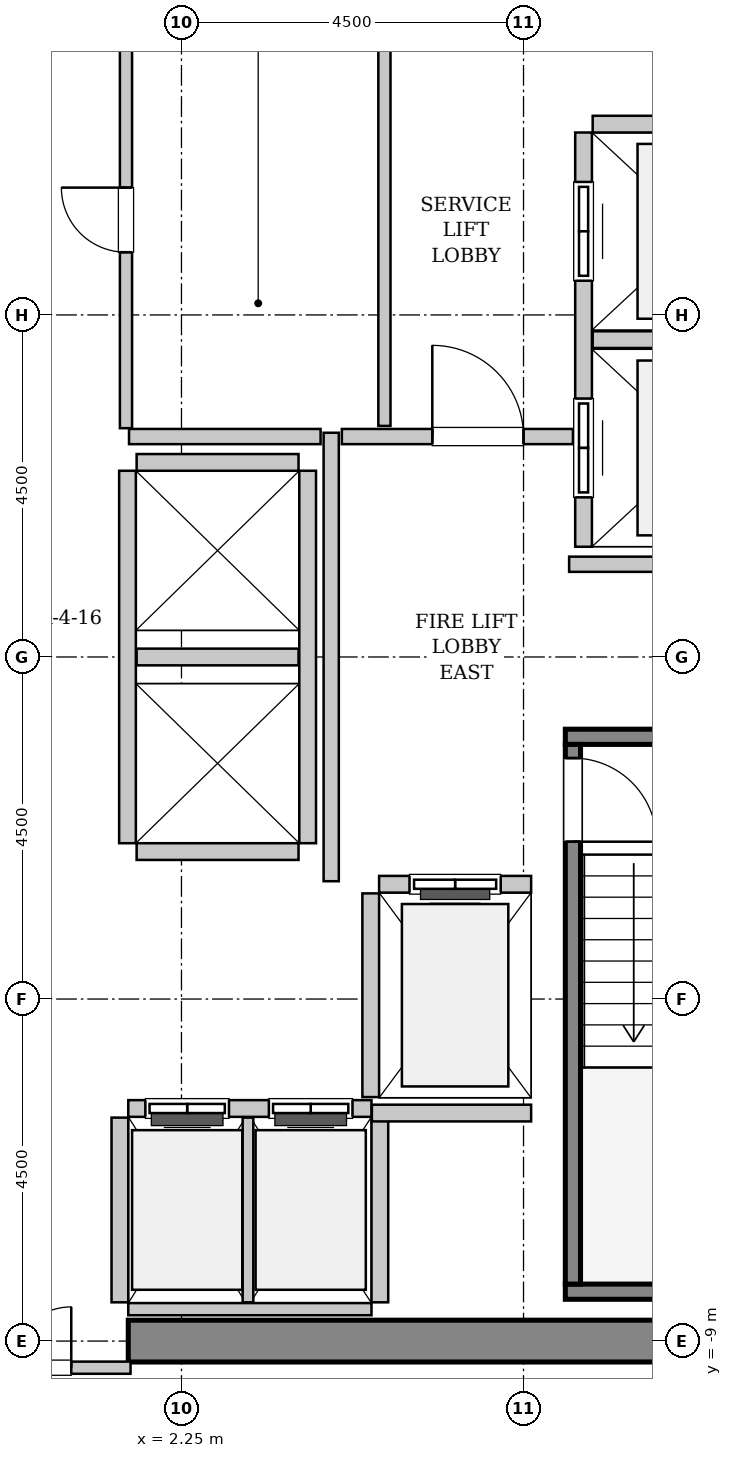
"""IFC4 building model, lengths in metres.
Left out: names, types, materials, properties, quantities, classifications, styles, units other than length and angle.
Written with IfcOpenShell. Run it as: python <this file> out.ifc"""

import sys

from ifc_helpers import new_model, si_unit, direction, frame, frame_2d, origin, place, context, subcontext, project, spatial, rectangle, extrude, source, transform, mapped, element, fill, save


model = new_model("IFC4")
c1 = context("Model", 3, precision=1e-05, world=origin(), true_north=direction((0.0, 1.0)))
c2 = subcontext(c1, "Body", "Model", "MODEL_VIEW")
j1 = project(units=[si_unit("LENGTHUNIT", "METRE"), si_unit("PLANEANGLEUNIT", "RADIAN")], contexts=[c1])
p1 = place(None, origin())
s1 = spatial("IfcSite", under=j1, at=p1, CompositionType="ELEMENT")
p2 = place(p1, origin())
s2 = spatial("IfcBuilding", under=s1, at=p2, CompositionType="ELEMENT")
p3 = place(p2, frame((0.0, 0.0, 160.2)))
s3 = spatial("IfcBuildingStorey", under=s2, at=p3, CompositionType="ELEMENT", Elevation=160.2)
m1 = source(origin(), c2, "Body", "SweptSolid", [
    extrude(rectangle(XDim=9.975, YDim=0.55, at=frame_2d((4.987, 0.0))), origin(), (0.0, 0.0, 1.0), 3.8),
])
p4 = place(p3, frame((1.55, -9.0, 0.0), z_axis=(0.0, 0.0, 1.0), x_axis=(1.0, 0.0, 0.0)))
e1 = element("IfcWall", 1, at=p4, inside=s3, PredefinedType="SHEAR", context=c2, shape_type="MappedRepresentation", body=[
    mapped(m1, transform((0.0, 0.0, 0.0), x_axis=(1.0, 0.0, 0.0), y_axis=(0.0, 1.0, 0.0), z_axis=(0.0, 0.0, 1.0), scale=1.0)),
])
m2 = source(origin(), c2, "Body", "SweptSolid", [
    extrude(rectangle(XDim=3.4, YDim=0.2, at=frame_2d((1.7, 0.0))), origin(), (0.0, 0.0, 1.0), 3.8),
])
p5 = place(p3, frame((7.3, -1.05, 0.0), z_axis=(0.0, 0.0, 1.0), x_axis=(1.0, 0.0, 0.0)))
e2 = element("IfcWall", 2, at=p5, inside=s3, PredefinedType="SOLIDWALL", context=c2, shape_type="MappedRepresentation", body=[
    mapped(m2, transform((0.0, 0.0, 0.0), x_axis=(1.0, 0.0, 0.0), y_axis=(0.0, 1.0, 0.0), z_axis=(0.0, 0.0, 1.0), scale=1.0)),
])
m3 = source(origin(), c2, "Body", "SweptSolid", [
    extrude(rectangle(XDim=3.68, YDim=0.2, at=frame_2d((1.84, 0.0))), origin(), (0.0, 0.0, 1.0), 3.8),
])
p6 = place(p3, frame((7.3, -8.35, 0.0), z_axis=(0.0, 0.0, 1.0), x_axis=(1.0, 0.0, 0.0)))
e3 = element("IfcWall", 3, at=p6, inside=s3, PredefinedType="SOLIDWALL", context=c2, shape_type="MappedRepresentation", body=[
    mapped(m3, transform((0.0, 0.0, 0.0), x_axis=(1.0, 0.0, 0.0), y_axis=(0.0, 1.0, 0.0), z_axis=(0.0, 0.0, 1.0), scale=1.0)),
])
m4 = source(origin(), c2, "Body", "SweptSolid", [
    extrude(rectangle(XDim=7.1, YDim=0.2, at=frame_2d((3.55, 0.0))), origin(), (0.0, 0.0, 1.0), 3.8),
])
p7 = place(p3, frame((7.4, -1.15, 0.0), z_axis=(0.0, 0.0, 1.0), x_axis=(0.0, -1.0, 0.0)))
e4 = element("IfcWall", 4, at=p7, inside=s3, PredefinedType="SOLIDWALL", context=c2, shape_type="MappedRepresentation", body=[
    mapped(m4, transform((0.0, 0.0, 0.0), x_axis=(1.0, 0.0, 0.0), y_axis=(0.0, 1.0, 0.0), z_axis=(0.0, 0.0, 1.0), scale=1.0)),
])
p8 = place(p7, frame((0.18, 0.0, 0.0)))
e5 = element("IfcOpeningElement", 5, at=p8, cuts=e4, PredefinedType="OPENING", context=c2, shape_type="SweptSolid", body=[
    extrude(rectangle(XDim=1.1, YDim=2.15, at=frame_2d((0.55, 1.075))), frame((0.0, 0.11, 0.0), z_axis=(0.0, -1.0, 0.0), x_axis=(1.0, 0.0, 0.0)), (0.0, 0.0, 1.0), 0.22),
])
m5 = source(origin(), c2, "Body", "SweptSolid", [
    extrude(rectangle(XDim=2.0, YDim=0.22, at=frame_2d((1.0, 0.0))), origin(), (0.0, 0.0, 1.0), 3.535),
])
p9 = place(p3, frame((6.85, -2.99, 0.0), z_axis=(0.0, 0.0, 1.0), x_axis=(-1.0, 0.0, 0.0)))
e6 = element("IfcWall", 6, at=p9, inside=s3, PredefinedType="SOLIDWALL", context=c2, shape_type="MappedRepresentation", body=[
    mapped(m5, transform((0.0, 0.0, 0.0), x_axis=(1.0, 0.0, 0.0), y_axis=(0.0, 1.0, 0.0), z_axis=(0.0, 0.0, 1.0), scale=1.0)),
])
p10 = place(p9, frame((0.4, 0.0, 0.0)))
e7 = element("IfcOpeningElement", 7, at=p10, cuts=e6, PredefinedType="OPENING", context=c2, shape_type="SweptSolid", body=[
    extrude(rectangle(XDim=1.2, YDim=2.2, at=frame_2d((0.6, 1.1))), frame((0.0, 0.12, 0.0), z_axis=(0.0, -1.0, 0.0), x_axis=(1.0, 0.0, 0.0)), (0.0, 0.0, 1.0), 0.24),
])
m6 = source(origin(), c2, "Body", "SweptSolid", [
    extrude(rectangle(XDim=2.68, YDim=0.22, at=frame_2d((1.34, 0.0))), origin(), (0.0, 0.0, 1.0), 3.535),
])
p11 = place(p3, frame((4.74, -3.11, 0.0), z_axis=(0.0, 0.0, 1.0), x_axis=(0.0, -1.0, 0.0)))
e8 = element("IfcWall", 8, at=p11, inside=s3, PredefinedType="SOLIDWALL", context=c2, shape_type="MappedRepresentation", body=[
    mapped(m6, transform((0.0, 0.0, 0.0), x_axis=(1.0, 0.0, 0.0), y_axis=(0.0, 1.0, 0.0), z_axis=(0.0, 0.0, 1.0), scale=1.0)),
])
m7 = source(origin(), c2, "Body", "SweptSolid", [
    extrude(rectangle(XDim=5.45, YDim=0.22, at=frame_2d((2.725, 0.0))), origin(), (0.0, 0.0, 1.0), 3.535),
])
p12 = place(p3, frame((7.54, 6.9, 0.0), z_axis=(0.0, 0.0, 1.0), x_axis=(0.0, -1.0, 0.0)))
e9 = element("IfcWall", 9, at=p12, inside=s3, PredefinedType="SOLIDWALL", context=c2, shape_type="MappedRepresentation", body=[
    mapped(m7, transform((0.0, 0.0, 0.0), x_axis=(1.0, 0.0, 0.0), y_axis=(0.0, 1.0, 0.0), z_axis=(0.0, 0.0, 1.0), scale=1.0)),
])
p13 = place(p12, frame((3.5, 0.0, 0.0)))
e10 = element("IfcOpeningElement", 10, at=p13, cuts=e9, PredefinedType="OPENING", context=c2, shape_type="SweptSolid", body=[
    extrude(rectangle(XDim=1.3, YDim=2.3, at=frame_2d((0.65, 1.15))), frame((0.0, 0.12, 0.0), z_axis=(0.0, -1.0, 0.0), x_axis=(1.0, 0.0, 0.0)), (0.0, 0.0, 1.0), 0.24),
])
p14 = place(p12, frame((0.65, 0.0, 0.0)))
e11 = element("IfcOpeningElement", 11, at=p14, cuts=e9, PredefinedType="OPENING", context=c2, shape_type="SweptSolid", body=[
    extrude(rectangle(XDim=1.3, YDim=2.3, at=frame_2d((0.65, 1.15))), frame((0.0, 0.12, 0.0), z_axis=(0.0, -1.0, 0.0), x_axis=(1.0, 0.0, 0.0)), (0.0, 0.0, 1.0), 0.24),
])
m8 = source(origin(), c2, "Body", "SweptSolid", [
    extrude(rectangle(XDim=2.78, YDim=0.22, at=frame_2d((1.39, 0.0))), origin(), (0.0, 0.0, 1.0), 3.535),
])
for number, where, z_axis, x_axis in (
    (12, (7.66, 4.175, 0.0), (0.0, 0.0, 1.0), (1.0, 0.0, 0.0)),
    (13, (10.44, 7.01, 0.0), (0.0, 0.0, 1.0), (-1.0, 0.0, 0.0)),
):
    element("IfcWall", number, at=place(p3, frame(where, z_axis=z_axis, x_axis=x_axis)), inside=s3, PredefinedType="SOLIDWALL", context=c2, shape_type="MappedRepresentation", body=[
        mapped(m8, transform((0.0, 0.0, 0.0), x_axis=(1.0, 0.0, 0.0), y_axis=(0.0, 1.0, 0.0), z_axis=(0.0, 0.0, 1.0), scale=1.0)),
    ])
m9 = source(origin(), c2, "Body", "SweptSolid", [
    extrude(rectangle(XDim=3.2, YDim=0.22, at=frame_2d((1.6, 0.0))), origin(), (0.0, 0.0, 1.0), 3.535),
])
p15 = place(p3, frame((4.75, -5.94, 0.0), z_axis=(0.0, 0.0, 1.0), x_axis=(-1.0, 0.0, 0.0)))
e14 = element("IfcWall", 14, at=p15, inside=s3, PredefinedType="SOLIDWALL", context=c2, shape_type="MappedRepresentation", body=[
    mapped(m9, transform((0.0, 0.0, 0.0), x_axis=(1.0, 0.0, 0.0), y_axis=(0.0, 1.0, 0.0), z_axis=(0.0, 0.0, 1.0), scale=1.0)),
])
p16 = place(p15, frame((1.875, 0.0, 0.0)))
e15 = element("IfcOpeningElement", 15, at=p16, cuts=e14, PredefinedType="OPENING", context=c2, shape_type="SweptSolid", body=[
    extrude(rectangle(XDim=1.1, YDim=2.2, at=frame_2d((0.55, 1.1))), frame((0.0, 0.12, 0.0), z_axis=(0.0, -1.0, 0.0), x_axis=(1.0, 0.0, 0.0)), (0.0, 0.0, 1.0), 0.24),
])
p17 = place(p15, frame((0.25, 0.0, 0.0)))
e16 = element("IfcOpeningElement", 16, at=p17, cuts=e14, PredefinedType="OPENING", context=c2, shape_type="SweptSolid", body=[
    extrude(rectangle(XDim=1.1, YDim=2.2, at=frame_2d((0.55, 1.1))), frame((0.0, 0.12, 0.0), z_axis=(0.0, -1.0, 0.0), x_axis=(1.0, 0.0, 0.0)), (0.0, 0.0, 1.0), 0.24),
])
m10 = source(origin(), c2, "Body", "SweptSolid", [
    extrude(rectangle(XDim=3.2, YDim=0.16, at=frame_2d((1.6, 0.0))), origin(), (0.0, 0.0, 1.0), 2.425),
])
p18 = place(p3, frame((1.55, -8.58, 0.0), z_axis=(0.0, 0.0, 1.0), x_axis=(1.0, 0.0, 0.0)))
e17 = element("IfcWall", 17, at=p18, inside=s3, PredefinedType="PARTITIONING", context=c2, shape_type="MappedRepresentation", body=[
    mapped(m10, transform((0.0, 0.0, 0.0), x_axis=(1.0, 0.0, 0.0), y_axis=(0.0, 1.0, 0.0), z_axis=(0.0, 0.0, 1.0), scale=1.0)),
])
m11 = source(origin(), c2, "Body", "SweptSolid", [
    extrude(rectangle(XDim=2.43, YDim=0.22, at=frame_2d((1.215, 0.0))), origin(), (0.0, 0.0, 1.0), 3.535),
])
p19 = place(p3, frame((1.44, -6.06, 0.0), z_axis=(0.0, 0.0, 1.0), x_axis=(0.0, -1.0, 0.0)))
e18 = element("IfcWall", 18, at=p19, inside=s3, PredefinedType="SOLIDWALL", context=c2, shape_type="MappedRepresentation", body=[
    mapped(m11, transform((0.0, 0.0, 0.0), x_axis=(1.0, 0.0, 0.0), y_axis=(0.0, 1.0, 0.0), z_axis=(0.0, 0.0, 1.0), scale=1.0)),
])
m12 = source(origin(), c2, "Body", "SweptSolid", [
    extrude(rectangle(XDim=2.43, YDim=0.14, at=frame_2d((1.215, 0.0))), origin(), (0.0, 0.0, 1.0), 3.535),
])
p20 = place(p3, frame((3.125, -8.49, 0.0), z_axis=(0.0, 0.0, 1.0), x_axis=(0.0, 1.0, 0.0)))
e19 = element("IfcWall", 19, at=p20, inside=s3, PredefinedType="PARTITIONING", context=c2, shape_type="MappedRepresentation", body=[
    mapped(m12, transform((0.0, 0.0, 0.0), x_axis=(1.0, 0.0, 0.0), y_axis=(0.0, 1.0, 0.0), z_axis=(0.0, 0.0, 1.0), scale=1.0)),
])
p21 = place(p3, frame((4.86, -8.49, 0.0), z_axis=(0.0, 0.0, 1.0), x_axis=(0.0, 1.0, 0.0)))
e20 = element("IfcWall", 20, at=p21, inside=s3, PredefinedType="SOLIDWALL", context=c2, shape_type="MappedRepresentation", body=[
    mapped(m11, transform((0.0, 0.0, 0.0), x_axis=(1.0, 0.0, 0.0), y_axis=(0.0, 1.0, 0.0), z_axis=(0.0, 0.0, 1.0), scale=1.0)),
])
m13 = source(origin(), c2, "Body", "SweptSolid", [
    extrude(rectangle(XDim=4.9, YDim=0.22, at=frame_2d((2.45, 0.0))), origin(), (0.0, 0.0, 1.0), 3.535),
])
for number, where, z_axis, x_axis in (
    (21, (1.54, 2.45, 0.0), (0.0, 0.0, 1.0), (0.0, -1.0, 0.0)),
    (22, (3.91, -2.45, 0.0), (0.0, 0.0, 1.0), (0.0, 1.0, 0.0)),
):
    element("IfcWall", number, at=place(p3, frame(where, z_axis=z_axis, x_axis=x_axis)), inside=s3, PredefinedType="SOLIDWALL", context=c2, shape_type="MappedRepresentation", body=[
        mapped(m13, transform((0.0, 0.0, 0.0), x_axis=(1.0, 0.0, 0.0), y_axis=(0.0, 1.0, 0.0), z_axis=(0.0, 0.0, 1.0), scale=1.0)),
    ])
m14 = source(origin(), c2, "Body", "SweptSolid", [
    extrude(rectangle(XDim=2.13, YDim=0.22, at=frame_2d((1.065, 0.0))), origin(), (0.0, 0.0, 1.0), 3.535),
])
for number, where, z_axis, x_axis in (
    (23, (1.66, -2.56, 0.0), (0.0, 0.0, 1.0), (1.0, 0.0, 0.0)),
    (24, (1.66, 0.0, 0.0), (0.0, 0.0, 1.0), (1.0, 0.0, 0.0)),
    (25, (3.79, 2.56, 0.0), (0.0, 0.0, 1.0), (-1.0, 0.0, 0.0)),
):
    element("IfcWall", number, at=place(p3, frame(where, z_axis=z_axis, x_axis=x_axis)), inside=s3, PredefinedType="SOLIDWALL", context=c2, shape_type="MappedRepresentation", body=[
        mapped(m14, transform((0.0, 0.0, 0.0), x_axis=(1.0, 0.0, 0.0), y_axis=(0.0, 1.0, 0.0), z_axis=(0.0, 0.0, 1.0), scale=1.0)),
    ])
m15 = source(origin(), c2, "Body", "SweptSolid", [
    extrude(rectangle(XDim=2.095, YDim=0.22, at=frame_2d((1.048, 0.0))), origin(), (0.0, 0.0, 1.0), 3.535),
])
p22 = place(p3, frame((4.755, -6.0, 0.0), z_axis=(0.0, 0.0, 1.0), x_axis=(1.0, 0.0, 0.0)))
e26 = element("IfcWall", 26, at=p22, inside=s3, PredefinedType="SOLIDWALL", context=c2, shape_type="MappedRepresentation", body=[
    mapped(m15, transform((0.0, 0.0, 0.0), x_axis=(1.0, 0.0, 0.0), y_axis=(0.0, 1.0, 0.0), z_axis=(0.0, 0.0, 1.0), scale=1.0)),
])
m16 = source(origin(), c2, "Body", "SweptSolid", [
    extrude(rectangle(XDim=5.9, YDim=0.2, at=frame_2d((2.95, 0.0))), origin(), (0.0, 0.0, 1.0), 3.535),
])
p23 = place(p3, frame((4.22, -2.95, 0.0), z_axis=(0.0, 0.0, 1.0), x_axis=(0.0, 1.0, 0.0)))
e27 = element("IfcWall", 27, at=p23, inside=s3, PredefinedType="PARTITIONING", context=c2, shape_type="MappedRepresentation", body=[
    mapped(m16, transform((0.0, 0.0, 0.0), x_axis=(1.0, 0.0, 0.0), y_axis=(0.0, 1.0, 0.0), z_axis=(0.0, 0.0, 1.0), scale=1.0)),
])
m17 = source(origin(), c2, "Body", "SweptSolid", [
    extrude(rectangle(XDim=2.52, YDim=0.2, at=frame_2d((1.26, 0.0))), origin(), (0.0, 0.0, 1.0), 3.535),
])
p24 = place(p3, frame((1.56, 2.9, 0.0), z_axis=(0.0, 0.0, 1.0), x_axis=(1.0, 0.0, 0.0)))
e28 = element("IfcWall", 28, at=p24, inside=s3, PredefinedType="PARTITIONING", context=c2, shape_type="MappedRepresentation", body=[
    mapped(m17, transform((0.0, 0.0, 0.0), x_axis=(1.0, 0.0, 0.0), y_axis=(0.0, 1.0, 0.0), z_axis=(0.0, 0.0, 1.0), scale=1.0)),
])
m18 = source(origin(), c2, "Body", "SweptSolid", [
    extrude(rectangle(XDim=3.04, YDim=0.2, at=frame_2d((1.52, 0.0))), origin(), (0.0, 0.0, 1.0), 3.535),
])
p25 = place(p3, frame((4.36, 2.9, 0.0), z_axis=(0.0, 0.0, 1.0), x_axis=(1.0, 0.0, 0.0)))
e29 = element("IfcWall", 29, at=p25, inside=s3, PredefinedType="PARTITIONING", context=c2, shape_type="MappedRepresentation", body=[
    mapped(m18, transform((0.0, 0.0, 0.0), x_axis=(1.0, 0.0, 0.0), y_axis=(0.0, 1.0, 0.0), z_axis=(0.0, 0.0, 1.0), scale=1.0)),
])
p26 = place(p25, frame((1.19, 0.0, 0.0)))
e30 = element("IfcOpeningElement", 30, at=p26, cuts=e29, PredefinedType="OPENING", context=c2, shape_type="SweptSolid", body=[
    extrude(rectangle(XDim=1.2, YDim=2.15, at=frame_2d((0.6, 1.075))), frame((0.0, 0.11, 0.0), z_axis=(0.0, -1.0, 0.0), x_axis=(1.0, 0.0, 0.0)), (0.0, 0.0, 1.0), 0.22),
])
m19 = source(origin(), c2, "Body", "SweptSolid", [
    extrude(rectangle(XDim=4.11, YDim=0.2, at=frame_2d((2.055, 0.0))), origin(), (0.0, 0.0, 1.0), 3.535),
])
p27 = place(p3, frame((7.35, 1.22, 0.0), z_axis=(0.0, 0.0, 1.0), x_axis=(1.0, 0.0, 0.0)))
e31 = element("IfcWall", 31, at=p27, inside=s3, PredefinedType="PARTITIONING", context=c2, shape_type="MappedRepresentation", body=[
    mapped(m19, transform((0.0, 0.0, 0.0), x_axis=(1.0, 0.0, 0.0), y_axis=(0.0, 1.0, 0.0), z_axis=(0.0, 0.0, 1.0), scale=1.0)),
])
m20 = source(origin(), c2, "Body", "SweptSolid", [
    extrude(rectangle(XDim=3.16, YDim=0.16, at=frame_2d((1.58, 0.0))), origin(), (0.0, 0.0, 1.0), 2.425),
])
p28 = place(p3, frame((-1.58, -9.35, 0.0), z_axis=(0.0, 0.0, 1.0), x_axis=(1.0, 0.0, 0.0)))
e32 = element("IfcWall", 32, at=p28, inside=s3, PredefinedType="PARTITIONING", context=c2, shape_type="MappedRepresentation", body=[
    mapped(m20, transform((0.0, 0.0, 0.0), x_axis=(1.0, 0.0, 0.0), y_axis=(0.0, 1.0, 0.0), z_axis=(0.0, 0.0, 1.0), scale=1.0)),
])
p29 = place(p28, frame((0.78, 0.0, 0.0)))
e33 = element("IfcOpeningElement", 33, at=p29, cuts=e32, PredefinedType="OPENING", context=c2, shape_type="SweptSolid", body=[
    extrude(rectangle(XDim=1.6, YDim=2.3, at=frame_2d((0.8, 1.15))), frame((0.0, 0.09, 0.0), z_axis=(0.0, -1.0, 0.0), x_axis=(1.0, 0.0, 0.0)), (0.0, 0.0, 1.0), 0.18),
])
m21 = source(origin(), c2, "Body", "SweptSolid", [
    extrude(rectangle(XDim=5.45, YDim=0.16, at=frame_2d((2.725, 0.0))), origin(), (0.0, 0.0, 1.0), 3.535),
])
p30 = place(p3, frame((4.92, 3.04, 0.0), z_axis=(0.0, 0.0, 1.0), x_axis=(0.0, 1.0, 0.0)))
e34 = element("IfcWall", 34, at=p30, inside=s3, PredefinedType="PARTITIONING", context=c2, shape_type="MappedRepresentation", body=[
    mapped(m21, transform((0.0, 0.0, 0.0), x_axis=(1.0, 0.0, 0.0), y_axis=(0.0, 1.0, 0.0), z_axis=(0.0, 0.0, 1.0), scale=1.0)),
])
m22 = source(origin(), c2, "Body", "SweptSolid", [
    extrude(rectangle(XDim=5.48, YDim=0.16, at=frame_2d((2.74, 0.0))), origin(), (0.0, 0.0, 1.0), 3.535),
])
p31 = place(p3, frame((1.52, 3.01, 0.0), z_axis=(0.0, 0.0, 1.0), x_axis=(0.0, 1.0, 0.0)))
e35 = element("IfcWall", 35, at=p31, inside=s3, PredefinedType="PARTITIONING", context=c2, shape_type="MappedRepresentation", body=[
    mapped(m22, transform((0.0, 0.0, 0.0), x_axis=(1.0, 0.0, 0.0), y_axis=(0.0, 1.0, 0.0), z_axis=(0.0, 0.0, 1.0), scale=1.0)),
])
p32 = place(p31, frame((2.315, 0.0, 0.0)))
e36 = element("IfcOpeningElement", 36, at=p32, cuts=e35, PredefinedType="OPENING", context=c2, shape_type="SweptSolid", body=[
    extrude(rectangle(XDim=0.85, YDim=2.1, at=frame_2d((0.425, 1.05))), frame((0.0, 0.09, 0.0), z_axis=(0.0, -1.0, 0.0), x_axis=(1.0, 0.0, 0.0)), (0.0, 0.0, 1.0), 0.18),
])
m23 = source(origin(), c2, "Body", "SweptSolid", [
    extrude(rectangle(XDim=1.1, YDim=2.15, at=frame_2d((0.55, 1.075))), frame((0.0, 0.025, 0.0), z_axis=(0.0, -1.0, 0.0), x_axis=(1.0, 0.0, 0.0)), (0.0, 0.0, 1.0), 0.05),
])
p33 = place(p8, origin())
e37 = element("IfcDoor", 37, at=p33, inside=s3, OperationType="SINGLE_SWING_RIGHT", PredefinedType="DOOR", context=c2, shape_type="MappedRepresentation", body=[
    mapped(m23, transform((0.0, 0.0, 0.0), x_axis=(1.0, 0.0, 0.0), y_axis=(0.0, 1.0, 0.0), z_axis=(0.0, 0.0, 1.0), scale=1.0)),
])
fill(e5, e37)
m24 = source(origin(), c2, "Body", "SweptSolid", [
    extrude(rectangle(XDim=1.2, YDim=2.2, at=frame_2d((0.6, 1.1))), frame((0.0, 0.025, 0.0), z_axis=(0.0, -1.0, 0.0), x_axis=(1.0, 0.0, 0.0)), (0.0, 0.0, 1.0), 0.05),
])
p34 = place(p10, origin())
e38 = element("IfcDoor", 38, at=p34, inside=s3, OperationType="SLIDING_TO_LEFT", PredefinedType="DOOR", context=c2, shape_type="MappedRepresentation", body=[
    mapped(m24, transform((0.0, 0.0, 0.0), x_axis=(1.0, 0.0, 0.0), y_axis=(0.0, 1.0, 0.0), z_axis=(0.0, 0.0, 1.0), scale=1.0)),
])
fill(e7, e38)
m25 = source(origin(), c2, "Body", "SweptSolid", [
    extrude(rectangle(XDim=1.3, YDim=2.3, at=frame_2d((0.65, 1.15))), frame((0.0, 0.025, 0.0), z_axis=(0.0, -1.0, 0.0), x_axis=(1.0, 0.0, 0.0)), (0.0, 0.0, 1.0), 0.05),
])
p35 = place(p13, origin())
e39 = element("IfcDoor", 39, at=p35, inside=s3, OperationType="SLIDING_TO_RIGHT", PredefinedType="DOOR", context=c2, shape_type="MappedRepresentation", body=[
    mapped(m25, transform((0.0, 0.0, 0.0), x_axis=(1.0, 0.0, 0.0), y_axis=(0.0, 1.0, 0.0), z_axis=(0.0, 0.0, 1.0), scale=1.0)),
])
fill(e10, e39)
p36 = place(p14, origin())
e40 = element("IfcDoor", 40, at=p36, inside=s3, OperationType="SLIDING_TO_RIGHT", PredefinedType="DOOR", context=c2, shape_type="MappedRepresentation", body=[
    mapped(m25, transform((0.0, 0.0, 0.0), x_axis=(1.0, 0.0, 0.0), y_axis=(0.0, 1.0, 0.0), z_axis=(0.0, 0.0, 1.0), scale=1.0)),
])
fill(e11, e40)
m26 = source(origin(), c2, "Body", "SweptSolid", [
    extrude(rectangle(XDim=1.1, YDim=2.2, at=frame_2d((0.55, 1.1))), frame((0.0, 0.025, 0.0), z_axis=(0.0, -1.0, 0.0), x_axis=(1.0, 0.0, 0.0)), (0.0, 0.0, 1.0), 0.05),
])
p37 = place(p16, origin())
e41 = element("IfcDoor", 41, at=p37, inside=s3, OperationType="DOUBLE_DOOR_SLIDING", PredefinedType="DOOR", context=c2, shape_type="MappedRepresentation", body=[
    mapped(m26, transform((0.0, 0.0, 0.0), x_axis=(1.0, 0.0, 0.0), y_axis=(0.0, 1.0, 0.0), z_axis=(0.0, 0.0, 1.0), scale=1.0)),
])
fill(e15, e41)
p38 = place(p17, origin())
e42 = element("IfcDoor", 42, at=p38, inside=s3, OperationType="DOUBLE_DOOR_SLIDING", PredefinedType="DOOR", context=c2, shape_type="MappedRepresentation", body=[
    mapped(m26, transform((0.0, 0.0, 0.0), x_axis=(1.0, 0.0, 0.0), y_axis=(0.0, 1.0, 0.0), z_axis=(0.0, 0.0, 1.0), scale=1.0)),
])
fill(e16, e42)
m27 = source(origin(), c2, "Body", "SweptSolid", [
    extrude(rectangle(XDim=1.2, YDim=2.15, at=frame_2d((0.6, 1.075))), frame((0.0, 0.025, 0.0), z_axis=(0.0, -1.0, 0.0), x_axis=(1.0, 0.0, 0.0)), (0.0, 0.0, 1.0), 0.05),
])
p39 = place(p26, origin())
e43 = element("IfcDoor", 43, at=p39, inside=s3, OperationType="SINGLE_SWING_LEFT", PredefinedType="DOOR", context=c2, shape_type="MappedRepresentation", body=[
    mapped(m27, transform((0.0, 0.0, 0.0), x_axis=(1.0, 0.0, 0.0), y_axis=(0.0, 1.0, 0.0), z_axis=(0.0, 0.0, 1.0), scale=1.0)),
])
fill(e30, e43)
m28 = source(origin(), c2, "Body", "SweptSolid", [
    extrude(rectangle(XDim=1.6, YDim=2.3, at=frame_2d((0.8, 1.15))), frame((0.0, 0.025, 0.0), z_axis=(0.0, -1.0, 0.0), x_axis=(1.0, 0.0, 0.0)), (0.0, 0.0, 1.0), 0.05),
])
p40 = place(p29, origin())
e44 = element("IfcDoor", 44, at=p40, inside=s3, OperationType="DOUBLE_DOOR_SINGLE_SWING", PredefinedType="DOOR", context=c2, shape_type="MappedRepresentation", body=[
    mapped(m28, transform((0.0, 0.0, 0.0), x_axis=(1.0, 0.0, 0.0), y_axis=(0.0, 1.0, 0.0), z_axis=(0.0, 0.0, 1.0), scale=1.0)),
])
fill(e33, e44)
m29 = source(origin(), c2, "Body", "SweptSolid", [
    extrude(rectangle(XDim=0.85, YDim=2.1, at=frame_2d((0.425, 1.05))), frame((0.0, 0.025, 0.0), z_axis=(0.0, -1.0, 0.0), x_axis=(1.0, 0.0, 0.0)), (0.0, 0.0, 1.0), 0.05),
])
p41 = place(p32, origin())
e45 = element("IfcDoor", 45, at=p41, inside=s3, OperationType="SINGLE_SWING_RIGHT", PredefinedType="DOOR", context=c2, shape_type="MappedRepresentation", body=[
    mapped(m29, transform((0.0, 0.0, 0.0), x_axis=(1.0, 0.0, 0.0), y_axis=(0.0, 1.0, 0.0), z_axis=(0.0, 0.0, 1.0), scale=1.0)),
])
fill(e36, e45)
save(model, sys.argv[1])
